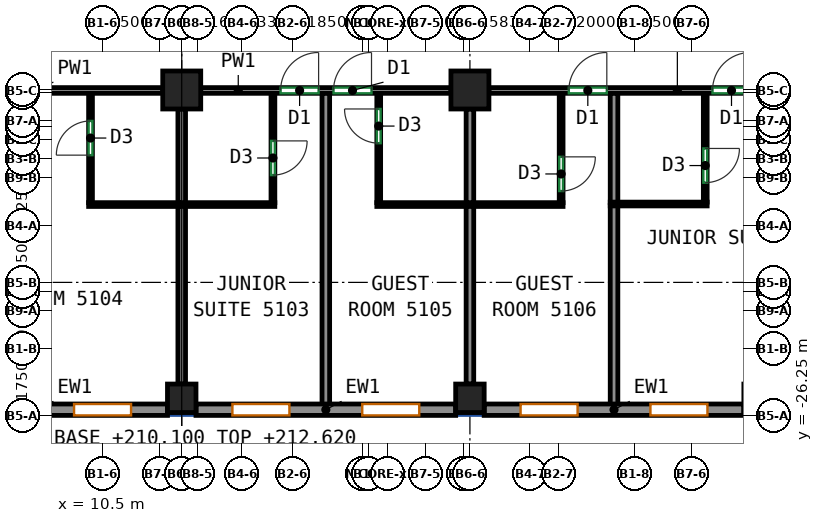
"""IFC4 building model, lengths in metres.
Left out: names, types, materials, properties, quantities, classifications, styles, units other than length and angle.
Written with IfcOpenShell. Run it as: python <this file> out.ifc"""

import sys

from ifc_helpers import new_model, si_unit, direction, frame, frame_2d, origin, origin_2d, place, context, subcontext, project, spatial, rectangle, extrude, source, transform, mapped, element, fill, save


model = new_model("IFC4")
c1 = context("Model", 3, precision=1e-05, world=origin(), true_north=direction((0.0, 1.0)))
c2 = subcontext(c1, "Body", "Model", "MODEL_VIEW")
j1 = project(units=[si_unit("LENGTHUNIT", "METRE"), si_unit("PLANEANGLEUNIT", "RADIAN")], contexts=[c1])
p1 = place(None, origin())
s1 = spatial("IfcSite", under=j1, at=p1, CompositionType="ELEMENT")
p2 = place(p1, origin())
s2 = spatial("IfcBuilding", under=s1, at=p2, CompositionType="ELEMENT")
p3 = place(p2, frame((0.0, 0.0, 210.1)))
s3 = spatial("IfcBuildingStorey", under=s2, at=p3, CompositionType="ELEMENT", Elevation=210.1)
m1 = source(origin(), c2, "Body", "SweptSolid", [
    extrude(rectangle(XDim=0.75, YDim=0.75, at=origin_2d()), origin(), (0.0, 0.0, 1.0), 3.12),
])
p4 = place(p3, frame((12.583, -25.8, 0.0), z_axis=(0.0, 0.0, 1.0), x_axis=(1.0, 0.0, 0.0)))
e1 = element("IfcColumn", 1, at=p4, inside=s3, PredefinedType="COLUMN", context=c2, shape_type="MappedRepresentation", body=[
    mapped(m1, transform((0.0, 0.0, 0.0))),
])
m2 = source(origin(), c2, "Body", "SweptSolid", [
    extrude(rectangle(XDim=1.0, YDim=1.0, at=origin_2d()), origin(), (0.0, 0.0, 1.0), 3.12),
])
p5 = place(p3, frame((12.583, -17.688, 0.0), z_axis=(0.0, 0.0, 1.0), x_axis=(1.0, 0.0, 0.0)))
e2 = element("IfcColumn", 2, at=p5, inside=s3, PredefinedType="COLUMN", context=c2, shape_type="MappedRepresentation", body=[
    mapped(m2, transform((0.0, 0.0, 0.0))),
])
p6 = place(p3, frame((20.167, -25.8, 0.0), z_axis=(0.0, 0.0, 1.0), x_axis=(1.0, 0.0, 0.0)))
e3 = element("IfcColumn", 3, at=p6, inside=s3, PredefinedType="COLUMN", context=c2, shape_type="MappedRepresentation", body=[
    mapped(m1, transform((0.0, 0.0, 0.0))),
])
p7 = place(p3, frame((20.167, -17.688, 0.0), z_axis=(0.0, 0.0, 1.0), x_axis=(1.0, 0.0, 0.0)))
e4 = element("IfcColumn", 4, at=p7, inside=s3, PredefinedType="COLUMN", context=c2, shape_type="MappedRepresentation", body=[
    mapped(m2, transform((0.0, 0.0, 0.0))),
])
m3 = source(origin(), c2, "Body", "SweptSolid", [
    extrude(rectangle(XDim=6.833, YDim=0.3, at=frame_2d((3.417, 0.0))), origin(), (0.0, 0.0, 1.0), 3.12),
])
p8 = place(p3, frame((5.375, -26.1, 0.0), z_axis=(0.0, 0.0, 1.0), x_axis=(1.0, 0.0, 0.0)))
e5 = element("IfcWall", 5, at=p8, inside=s3, PredefinedType="SOLIDWALL", context=c2, shape_type="MappedRepresentation", body=[
    mapped(m3, transform((0.0, 0.0, 0.0))),
])
p9 = place(p8, frame((0.958, 0.0, 0.85)))
e6 = element("IfcOpeningElement", 6, at=p9, cuts=e5, PredefinedType="OPENING", context=c2, shape_type="SweptSolid", body=[
    extrude(rectangle(XDim=1.5, YDim=1.95, at=frame_2d((0.75, 0.975))), frame((0.0, 0.16, 0.0), z_axis=(0.0, -1.0, 0.0), x_axis=(1.0, 0.0, 0.0)), (0.0, 0.0, 1.0), 0.32),
])
p10 = place(p8, frame((4.375, 0.0, 0.85)))
e7 = element("IfcOpeningElement", 7, at=p10, cuts=e5, PredefinedType="OPENING", context=c2, shape_type="SweptSolid", body=[
    extrude(rectangle(XDim=1.5, YDim=1.95, at=frame_2d((0.75, 0.975))), frame((0.0, 0.16, 0.0), z_axis=(0.0, -1.0, 0.0), x_axis=(1.0, 0.0, 0.0)), (0.0, 0.0, 1.0), 0.32),
])
m4 = source(origin(), c2, "Body", "SweptSolid", [
    extrude(rectangle(XDim=6.833, YDim=0.3, at=frame_2d((3.417, 0.0))), origin(), (0.0, 0.0, 1.0), 3.12),
])
p11 = place(p3, frame((12.958, -26.1, 0.0), z_axis=(0.0, 0.0, 1.0), x_axis=(1.0, 0.0, 0.0)))
e8 = element("IfcWall", 8, at=p11, inside=s3, PredefinedType="SOLIDWALL", context=c2, shape_type="MappedRepresentation", body=[
    mapped(m4, transform((0.0, 0.0, 0.0))),
])
p12 = place(p11, frame((0.958, 0.0, 0.85)))
e9 = element("IfcOpeningElement", 9, at=p12, cuts=e8, PredefinedType="OPENING", context=c2, shape_type="SweptSolid", body=[
    extrude(rectangle(XDim=1.5, YDim=1.95, at=frame_2d((0.75, 0.975))), frame((0.0, 0.16, 0.0), z_axis=(0.0, -1.0, 0.0), x_axis=(1.0, 0.0, 0.0)), (0.0, 0.0, 1.0), 0.32),
])
p13 = place(p11, frame((4.375, 0.0, 0.85)))
e10 = element("IfcOpeningElement", 10, at=p13, cuts=e8, PredefinedType="OPENING", context=c2, shape_type="SweptSolid", body=[
    extrude(rectangle(XDim=1.5, YDim=1.95, at=frame_2d((0.75, 0.975))), frame((0.0, 0.16, 0.0), z_axis=(0.0, -1.0, 0.0), x_axis=(1.0, 0.0, 0.0)), (0.0, 0.0, 1.0), 0.32),
])
p14 = place(p3, frame((20.542, -26.1, 0.0), z_axis=(0.0, 0.0, 1.0), x_axis=(1.0, 0.0, 0.0)))
e11 = element("IfcWall", 11, at=p14, inside=s3, PredefinedType="SOLIDWALL", context=c2, shape_type="MappedRepresentation", body=[
    mapped(m3, transform((0.0, 0.0, 0.0))),
])
p15 = place(p14, frame((0.958, 0.0, 0.85)))
e12 = element("IfcOpeningElement", 12, at=p15, cuts=e11, PredefinedType="OPENING", context=c2, shape_type="SweptSolid", body=[
    extrude(rectangle(XDim=1.5, YDim=1.95, at=frame_2d((0.75, 0.975))), frame((0.0, 0.16, 0.0), z_axis=(0.0, -1.0, 0.0), x_axis=(1.0, 0.0, 0.0)), (0.0, 0.0, 1.0), 0.32),
])
p16 = place(p14, frame((4.375, 0.0, 0.85)))
e13 = element("IfcOpeningElement", 13, at=p16, cuts=e11, PredefinedType="OPENING", context=c2, shape_type="SweptSolid", body=[
    extrude(rectangle(XDim=1.5, YDim=1.95, at=frame_2d((0.75, 0.975))), frame((0.0, 0.16, 0.0), z_axis=(0.0, -1.0, 0.0), x_axis=(1.0, 0.0, 0.0)), (0.0, 0.0, 1.0), 0.32),
])
p17 = place(p3, frame((5.5, -17.7, 0.0), z_axis=(0.0, 0.0, 1.0), x_axis=(1.0, 0.0, 0.0)))
e14 = element("IfcWall", 14, at=p17, inside=s3, PredefinedType="PARTITIONING", context=c2, shape_type="SweptSolid", body=[
    extrude(rectangle(XDim=6.583, YDim=0.15, at=frame_2d((3.292, 0.0))), origin(), (0.0, 0.0, 1.0), 3.12),
])
p18 = place(p17, frame((0.303, 0.0, 0.0)))
e15 = element("IfcOpeningElement", 15, at=p18, cuts=e14, PredefinedType="OPENING", context=c2, shape_type="SweptSolid", body=[
    extrude(rectangle(XDim=1.0, YDim=2.1, at=frame_2d((0.5, 1.05))), frame((0.0, 0.085, 0.0), z_axis=(0.0, -1.0, 0.0), x_axis=(1.0, 0.0, 0.0)), (0.0, 0.0, 1.0), 0.17),
])
p19 = place(p3, frame((13.083, -17.7, 0.0), z_axis=(0.0, 0.0, 1.0), x_axis=(1.0, 0.0, 0.0)))
e16 = element("IfcWall", 16, at=p19, inside=s3, PredefinedType="PARTITIONING", context=c2, shape_type="SweptSolid", body=[
    extrude(rectangle(XDim=6.584, YDim=0.15, at=frame_2d((3.292, 0.0))), origin(), (0.0, 0.0, 1.0), 3.12),
])
p20 = place(p19, frame((2.102, 0.0, 0.0)))
e17 = element("IfcOpeningElement", 17, at=p20, cuts=e16, PredefinedType="OPENING", context=c2, shape_type="SweptSolid", body=[
    extrude(rectangle(XDim=1.0, YDim=2.1, at=frame_2d((0.5, 1.05))), frame((0.0, 0.085, 0.0), z_axis=(0.0, -1.0, 0.0), x_axis=(1.0, 0.0, 0.0)), (0.0, 0.0, 1.0), 0.17),
])
p21 = place(p19, frame((3.494, 0.0, 0.0)))
e18 = element("IfcOpeningElement", 18, at=p21, cuts=e16, PredefinedType="OPENING", context=c2, shape_type="SweptSolid", body=[
    extrude(rectangle(XDim=1.0, YDim=2.1, at=frame_2d((0.5, 1.05))), frame((0.0, 0.085, 0.0), z_axis=(0.0, -1.0, 0.0), x_axis=(1.0, 0.0, 0.0)), (0.0, 0.0, 1.0), 0.17),
])
p22 = place(p3, frame((20.667, -17.7, 0.0), z_axis=(0.0, 0.0, 1.0), x_axis=(1.0, 0.0, 0.0)))
e19 = element("IfcWall", 19, at=p22, inside=s3, PredefinedType="PARTITIONING", context=c2, shape_type="SweptSolid", body=[
    extrude(rectangle(XDim=7.083, YDim=0.15, at=frame_2d((3.542, 0.0))), origin(), (0.0, 0.0, 1.0), 2.52),
])
p23 = place(p22, frame((2.102, 0.0, 0.0)))
e20 = element("IfcOpeningElement", 20, at=p23, cuts=e19, PredefinedType="OPENING", context=c2, shape_type="SweptSolid", body=[
    extrude(rectangle(XDim=1.0, YDim=2.1, at=frame_2d((0.5, 1.05))), frame((0.0, 0.085, 0.0), z_axis=(0.0, -1.0, 0.0), x_axis=(1.0, 0.0, 0.0)), (0.0, 0.0, 1.0), 0.17),
])
p24 = place(p22, frame((5.883, 0.0, 0.0)))
e21 = element("IfcOpeningElement", 21, at=p24, cuts=e19, PredefinedType="OPENING", context=c2, shape_type="SweptSolid", body=[
    extrude(rectangle(XDim=1.0, YDim=2.1, at=frame_2d((0.5, 1.05))), frame((0.0, 0.085, 0.0), z_axis=(0.0, -1.0, 0.0), x_axis=(1.0, 0.0, 0.0)), (0.0, 0.0, 1.0), 0.17),
])
p25 = place(p3, frame((10.183, -20.652, 0.0), z_axis=(0.0, 0.0, 1.0), x_axis=(0.0, 1.0, 0.0)))
e22 = element("IfcWall", 22, at=p25, inside=s3, PredefinedType="PARTITIONING", context=c2, shape_type="SweptSolid", body=[
    extrude(rectangle(XDim=2.875, YDim=0.1, at=frame_2d((1.438, 0.0))), origin(), (0.0, 0.0, 1.0), 3.12),
])
p26 = place(p25, frame((1.25, 0.0, 0.0)))
e23 = element("IfcOpeningElement", 23, at=p26, cuts=e22, PredefinedType="OPENING", context=c2, shape_type="SweptSolid", body=[
    extrude(rectangle(XDim=0.9, YDim=2.1, at=frame_2d((0.45, 1.05))), frame((0.0, 0.06, 0.0), z_axis=(0.0, -1.0, 0.0), x_axis=(1.0, 0.0, 0.0)), (0.0, 0.0, 1.0), 0.12),
])
p27 = place(p3, frame((10.133, -20.702, 0.0), z_axis=(0.0, 0.0, 1.0), x_axis=(1.0, 0.0, 0.0)))
e24 = element("IfcWall", 24, at=p27, inside=s3, PredefinedType="PARTITIONING", context=c2, shape_type="SweptSolid", body=[
    extrude(rectangle(XDim=4.9, YDim=0.1, at=frame_2d((2.45, 0.0))), origin(), (0.0, 0.0, 1.0), 3.12),
])
p28 = place(p3, frame((12.583, -25.425, 0.0), z_axis=(0.0, 0.0, 1.0), x_axis=(0.0, 1.0, 0.0)))
e25 = element("IfcWall", 25, at=p28, inside=s3, PredefinedType="PARTITIONING", context=c2, shape_type="SweptSolid", body=[
    extrude(rectangle(XDim=4.673, YDim=0.2, at=frame_2d((2.336, 0.0))), origin(), (0.0, 0.0, 1.0), 3.12),
])
p29 = place(p3, frame((12.583, -20.652, 0.0), z_axis=(0.0, 0.0, 1.0), x_axis=(0.0, 1.0, 0.0)))
e26 = element("IfcWall", 26, at=p29, inside=s3, PredefinedType="PARTITIONING", context=c2, shape_type="SweptSolid", body=[
    extrude(rectangle(XDim=2.464, YDim=0.2, at=frame_2d((1.232, 0.0))), origin(), (0.0, 0.0, 1.0), 3.12),
])
p30 = place(p3, frame((14.983, -17.777, 0.0), z_axis=(0.0, 0.0, 1.0), x_axis=(0.0, -1.0, 0.0)))
e27 = element("IfcWall", 27, at=p30, inside=s3, PredefinedType="PARTITIONING", context=c2, shape_type="SweptSolid", body=[
    extrude(rectangle(XDim=2.875, YDim=0.1, at=frame_2d((1.438, 0.0))), origin(), (0.0, 0.0, 1.0), 3.12),
])
p31 = place(p30, frame((1.25, 0.0, 0.0)))
e28 = element("IfcOpeningElement", 28, at=p31, cuts=e27, PredefinedType="OPENING", context=c2, shape_type="SweptSolid", body=[
    extrude(rectangle(XDim=0.9, YDim=2.1, at=frame_2d((0.45, 1.05))), frame((0.0, 0.06, 0.0), z_axis=(0.0, -1.0, 0.0), x_axis=(1.0, 0.0, 0.0)), (0.0, 0.0, 1.0), 0.12),
])
p32 = place(p3, frame((16.375, -26.0, 0.0), z_axis=(0.0, 0.0, 1.0), x_axis=(0.0, 1.0, 0.0)))
e29 = element("IfcWall", 29, at=p32, inside=s3, PredefinedType="PARTITIONING", context=c2, shape_type="SweptSolid", body=[
    extrude(rectangle(XDim=8.223, YDim=0.2, at=frame_2d((4.111, 0.0))), origin(), (0.0, 0.0, 1.0), 3.12),
])
p33 = place(p3, frame((17.767, -20.652, 0.0), z_axis=(0.0, 0.0, 1.0), x_axis=(0.0, 1.0, 0.0)))
e30 = element("IfcWall", 30, at=p33, inside=s3, PredefinedType="PARTITIONING", context=c2, shape_type="SweptSolid", body=[
    extrude(rectangle(XDim=2.875, YDim=0.1, at=frame_2d((1.438, 0.0))), origin(), (0.0, 0.0, 1.0), 3.12),
])
p34 = place(p33, frame((1.565, 0.0, 0.0)))
e31 = element("IfcOpeningElement", 31, at=p34, cuts=e30, PredefinedType="OPENING", context=c2, shape_type="SweptSolid", body=[
    extrude(rectangle(XDim=0.9, YDim=2.1, at=frame_2d((0.45, 1.05))), frame((0.0, 0.06, 0.0), z_axis=(0.0, -1.0, 0.0), x_axis=(1.0, 0.0, 0.0)), (0.0, 0.0, 1.0), 0.12),
])
p35 = place(p3, frame((17.717, -20.702, 0.0), z_axis=(0.0, 0.0, 1.0), x_axis=(1.0, 0.0, 0.0)))
e32 = element("IfcWall", 32, at=p35, inside=s3, PredefinedType="PARTITIONING", context=c2, shape_type="SweptSolid", body=[
    extrude(rectangle(XDim=4.9, YDim=0.1, at=frame_2d((2.45, 0.0))), origin(), (0.0, 0.0, 1.0), 3.12),
])
p36 = place(p3, frame((20.167, -25.425, 0.0), z_axis=(0.0, 0.0, 1.0), x_axis=(0.0, 1.0, 0.0)))
e33 = element("IfcWall", 33, at=p36, inside=s3, PredefinedType="PARTITIONING", context=c2, shape_type="SweptSolid", body=[
    extrude(rectangle(XDim=4.673, YDim=0.2, at=frame_2d((2.336, 0.0))), origin(), (0.0, 0.0, 1.0), 3.12),
])
p37 = place(p3, frame((20.167, -20.652, 0.0), z_axis=(0.0, 0.0, 1.0), x_axis=(0.0, 1.0, 0.0)))
e34 = element("IfcWall", 34, at=p37, inside=s3, PredefinedType="PARTITIONING", context=c2, shape_type="SweptSolid", body=[
    extrude(rectangle(XDim=2.464, YDim=0.2, at=frame_2d((1.232, 0.0))), origin(), (0.0, 0.0, 1.0), 3.12),
])
p38 = place(p3, frame((22.567, -17.777, 0.0), z_axis=(0.0, 0.0, 1.0), x_axis=(0.0, -1.0, 0.0)))
e35 = element("IfcWall", 35, at=p38, inside=s3, PredefinedType="PARTITIONING", context=c2, shape_type="SweptSolid", body=[
    extrude(rectangle(XDim=2.875, YDim=0.1, at=frame_2d((1.438, 0.0))), origin(), (0.0, 0.0, 1.0), 3.12),
])
p39 = place(p38, frame((1.67, 0.0, 0.0)))
e36 = element("IfcOpeningElement", 36, at=p39, cuts=e35, PredefinedType="OPENING", context=c2, shape_type="SweptSolid", body=[
    extrude(rectangle(XDim=0.9, YDim=2.1, at=frame_2d((0.45, 1.05))), frame((0.0, 0.06, 0.0), z_axis=(0.0, -1.0, 0.0), x_axis=(1.0, 0.0, 0.0)), (0.0, 0.0, 1.0), 0.12),
])
p40 = place(p3, frame((23.959, -26.0, 0.0), z_axis=(0.0, 0.0, 1.0), x_axis=(0.0, 1.0, 0.0)))
e37 = element("IfcWall", 37, at=p40, inside=s3, PredefinedType="PARTITIONING", context=c2, shape_type="SweptSolid", body=[
    extrude(rectangle(XDim=5.272, YDim=0.2, at=frame_2d((2.636, 0.0))), origin(), (0.0, 0.0, 1.0), 3.12),
])
p41 = place(p3, frame((23.959, -20.648, 0.0), z_axis=(0.0, 0.0, 1.0), x_axis=(0.0, 1.0, 0.0)))
e38 = element("IfcWall", 38, at=p41, inside=s3, PredefinedType="PARTITIONING", context=c2, shape_type="SweptSolid", body=[
    extrude(rectangle(XDim=2.871, YDim=0.2, at=frame_2d((1.436, 0.0))), origin(), (0.0, 0.0, 1.0), 3.12),
])
p42 = place(p3, frame((23.859, -20.688, 0.0), z_axis=(0.0, 0.0, 1.0), x_axis=(1.0, 0.0, 0.0)))
e39 = element("IfcWall", 39, at=p42, inside=s3, PredefinedType="PARTITIONING", context=c2, shape_type="SweptSolid", body=[
    extrude(rectangle(XDim=2.55, YDim=0.1, at=frame_2d((1.275, 0.0))), origin(), (0.0, 0.0, 1.0), 3.12),
])
p43 = place(p3, frame((26.359, -17.777, 0.0), z_axis=(0.0, 0.0, 1.0), x_axis=(0.0, -1.0, 0.0)))
e40 = element("IfcWall", 40, at=p43, inside=s3, PredefinedType="PARTITIONING", context=c2, shape_type="SweptSolid", body=[
    extrude(rectangle(XDim=2.861, YDim=0.1, at=frame_2d((1.43, 0.0))), origin(), (0.0, 0.0, 1.0), 3.12),
])
p44 = place(p43, frame((1.449, 0.0, 0.0)))
e41 = element("IfcOpeningElement", 41, at=p44, cuts=e40, PredefinedType="OPENING", context=c2, shape_type="SweptSolid", body=[
    extrude(rectangle(XDim=0.9, YDim=2.1, at=frame_2d((0.45, 1.05))), frame((0.0, 0.06, 0.0), z_axis=(0.0, -1.0, 0.0), x_axis=(1.0, 0.0, 0.0)), (0.0, 0.0, 1.0), 0.12),
])
p45 = place(p10, origin())
e42 = element("IfcWindow", 42, at=p45, inside=s3, PartitioningType="SINGLE_PANEL", PredefinedType="WINDOW", context=c2, shape_type="SweptSolid", body=[
    extrude(rectangle(XDim=1.5, YDim=1.95, at=frame_2d((0.75, 0.975))), frame((0.0, 0.03, 0.0), z_axis=(0.0, -1.0, 0.0), x_axis=(1.0, 0.0, 0.0)), (0.0, 0.0, 1.0), 0.06),
])
fill(e7, e42)
p46 = place(p12, origin())
e43 = element("IfcWindow", 43, at=p46, inside=s3, PartitioningType="SINGLE_PANEL", PredefinedType="WINDOW", context=c2, shape_type="SweptSolid", body=[
    extrude(rectangle(XDim=1.5, YDim=1.95, at=frame_2d((0.75, 0.975))), frame((0.0, 0.03, 0.0), z_axis=(0.0, -1.0, 0.0), x_axis=(1.0, 0.0, 0.0)), (0.0, 0.0, 1.0), 0.06),
])
fill(e9, e43)
p47 = place(p13, origin())
e44 = element("IfcWindow", 44, at=p47, inside=s3, PartitioningType="SINGLE_PANEL", PredefinedType="WINDOW", context=c2, shape_type="SweptSolid", body=[
    extrude(rectangle(XDim=1.5, YDim=1.95, at=frame_2d((0.75, 0.975))), frame((0.0, 0.03, 0.0), z_axis=(0.0, -1.0, 0.0), x_axis=(1.0, 0.0, 0.0)), (0.0, 0.0, 1.0), 0.06),
])
fill(e10, e44)
p48 = place(p15, origin())
e45 = element("IfcWindow", 45, at=p48, inside=s3, PartitioningType="SINGLE_PANEL", PredefinedType="WINDOW", context=c2, shape_type="SweptSolid", body=[
    extrude(rectangle(XDim=1.5, YDim=1.95, at=frame_2d((0.75, 0.975))), frame((0.0, 0.03, 0.0), z_axis=(0.0, -1.0, 0.0), x_axis=(1.0, 0.0, 0.0)), (0.0, 0.0, 1.0), 0.06),
])
fill(e12, e45)
p49 = place(p16, origin())
e46 = element("IfcWindow", 46, at=p49, inside=s3, PartitioningType="SINGLE_PANEL", PredefinedType="WINDOW", context=c2, shape_type="SweptSolid", body=[
    extrude(rectangle(XDim=1.5, YDim=1.95, at=frame_2d((0.75, 0.975))), frame((0.0, 0.03, 0.0), z_axis=(0.0, -1.0, 0.0), x_axis=(1.0, 0.0, 0.0)), (0.0, 0.0, 1.0), 0.06),
])
fill(e13, e46)
p50 = place(p39, origin())
e47 = element("IfcDoor", 47, at=p50, inside=s3, OperationType="SINGLE_SWING_LEFT", PredefinedType="DOOR", context=c2, shape_type="SweptSolid", body=[
    extrude(rectangle(XDim=0.9, YDim=2.1, at=frame_2d((0.45, 1.05))), frame((0.0, 0.025, 0.0), z_axis=(0.0, -1.0, 0.0), x_axis=(1.0, 0.0, 0.0)), (0.0, 0.0, 1.0), 0.05),
])
fill(e36, e47)
p51 = place(p44, origin())
e48 = element("IfcDoor", 48, at=p51, inside=s3, OperationType="SINGLE_SWING_LEFT", PredefinedType="DOOR", context=c2, shape_type="SweptSolid", body=[
    extrude(rectangle(XDim=0.9, YDim=2.1, at=frame_2d((0.45, 1.05))), frame((0.0, 0.025, 0.0), z_axis=(0.0, -1.0, 0.0), x_axis=(1.0, 0.0, 0.0)), (0.0, 0.0, 1.0), 0.05),
])
fill(e41, e48)
p52 = place(p31, origin())
e49 = element("IfcDoor", 49, at=p52, inside=s3, OperationType="SINGLE_SWING_LEFT", PredefinedType="DOOR", context=c2, shape_type="SweptSolid", body=[
    extrude(rectangle(XDim=0.9, YDim=2.1, at=frame_2d((0.45, 1.05))), frame((0.0, 0.025, 0.0), z_axis=(0.0, -1.0, 0.0), x_axis=(1.0, 0.0, 0.0)), (0.0, 0.0, 1.0), 0.05),
])
fill(e28, e49)
p53 = place(p26, origin())
e50 = element("IfcDoor", 50, at=p53, inside=s3, OperationType="SINGLE_SWING_LEFT", PredefinedType="DOOR", context=c2, shape_type="SweptSolid", body=[
    extrude(rectangle(XDim=0.9, YDim=2.1, at=frame_2d((0.45, 1.05))), frame((0.0, 0.025, 0.0), z_axis=(0.0, -1.0, 0.0), x_axis=(1.0, 0.0, 0.0)), (0.0, 0.0, 1.0), 0.05),
])
fill(e23, e50)
p54 = place(p34, origin())
e51 = element("IfcDoor", 51, at=p54, inside=s3, OperationType="SINGLE_SWING_RIGHT", PredefinedType="DOOR", context=c2, shape_type="SweptSolid", body=[
    extrude(rectangle(XDim=0.9, YDim=2.1, at=frame_2d((0.45, 1.05))), frame((0.0, 0.025, 0.0), z_axis=(0.0, -1.0, 0.0), x_axis=(1.0, 0.0, 0.0)), (0.0, 0.0, 1.0), 0.05),
])
fill(e31, e51)
p55 = place(p20, origin())
e52 = element("IfcDoor", 52, at=p55, inside=s3, OperationType="SINGLE_SWING_RIGHT", PredefinedType="DOOR", context=c2, shape_type="SweptSolid", body=[
    extrude(rectangle(XDim=1.0, YDim=2.1, at=frame_2d((0.5, 1.05))), frame((0.0, 0.025, 0.0), z_axis=(0.0, -1.0, 0.0), x_axis=(1.0, 0.0, 0.0)), (0.0, 0.0, 1.0), 0.05),
])
fill(e17, e52)
p56 = place(p21, origin())
e53 = element("IfcDoor", 53, at=p56, inside=s3, OperationType="SINGLE_SWING_RIGHT", PredefinedType="DOOR", context=c2, shape_type="SweptSolid", body=[
    extrude(rectangle(XDim=1.0, YDim=2.1, at=frame_2d((0.5, 1.05))), frame((0.0, 0.025, 0.0), z_axis=(0.0, -1.0, 0.0), x_axis=(1.0, 0.0, 0.0)), (0.0, 0.0, 1.0), 0.05),
])
fill(e18, e53)
p57 = place(p23, origin())
e54 = element("IfcDoor", 54, at=p57, inside=s3, OperationType="SINGLE_SWING_RIGHT", PredefinedType="DOOR", context=c2, shape_type="SweptSolid", body=[
    extrude(rectangle(XDim=1.0, YDim=2.1, at=frame_2d((0.5, 1.05))), frame((0.0, 0.025, 0.0), z_axis=(0.0, -1.0, 0.0), x_axis=(1.0, 0.0, 0.0)), (0.0, 0.0, 1.0), 0.05),
])
fill(e20, e54)
p58 = place(p24, origin())
e55 = element("IfcDoor", 55, at=p58, inside=s3, OperationType="SINGLE_SWING_RIGHT", PredefinedType="DOOR", context=c2, shape_type="SweptSolid", body=[
    extrude(rectangle(XDim=1.0, YDim=2.1, at=frame_2d((0.5, 1.05))), frame((0.0, 0.025, 0.0), z_axis=(0.0, -1.0, 0.0), x_axis=(1.0, 0.0, 0.0)), (0.0, 0.0, 1.0), 0.05),
])
fill(e21, e55)
save(model, sys.argv[1])
